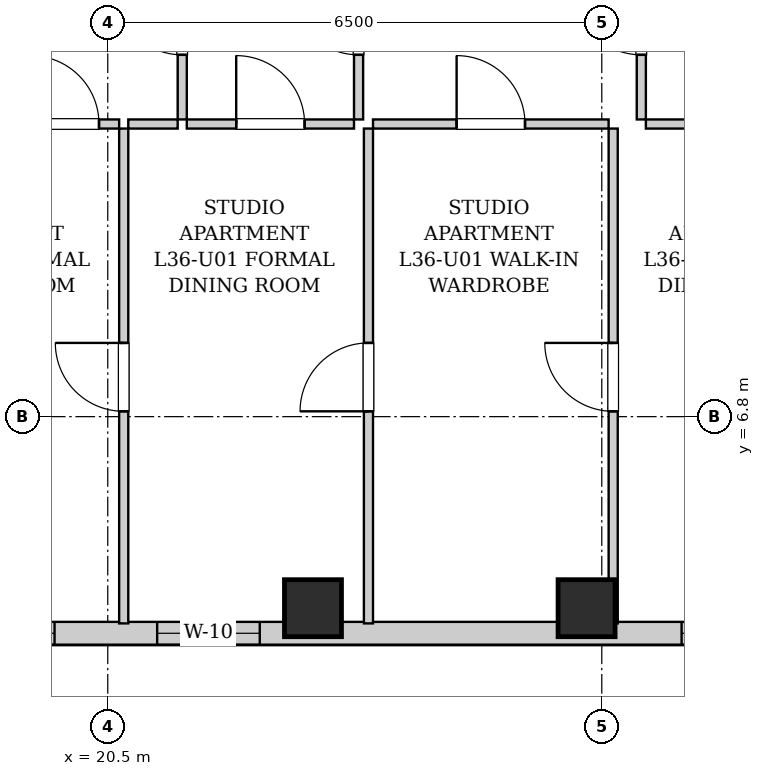
"""IFC4 building model, lengths in metres.
Left out: names, types, materials, properties, quantities, classifications, styles, units other than length and angle.
Written with IfcOpenShell. Run it as: python <this file> out.ifc"""

import sys

from ifc_helpers import new_model, si_unit, direction, frame, frame_2d, origin, origin_2d, place, context, subcontext, project, spatial, rectangle, extrude, element, fill, save


model = new_model("IFC4")
c1 = context("Model", 3, precision=1e-05, world=origin(), true_north=direction((0.0, 1.0)))
c2 = subcontext(c1, "Body", "Model", "MODEL_VIEW")
j1 = project(units=[si_unit("LENGTHUNIT", "METRE"), si_unit("PLANEANGLEUNIT", "RADIAN")], contexts=[c1])
p1 = place(None, origin())
s1 = spatial("IfcSite", under=j1, at=p1, CompositionType="ELEMENT")
p2 = place(p1, origin())
s2 = spatial("IfcBuilding", under=s1, at=p2, CompositionType="ELEMENT")
p3 = place(p2, frame((0.0, 0.0, 127.65)))
s3 = spatial("IfcBuildingStorey", under=s2, at=p3, CompositionType="ELEMENT", Elevation=127.65)
for number, where, z_axis, x_axis in (
    (1, (23.2, 4.28, 0.0), (0.0, 0.0, 1.0), (1.0, 0.0, 0.0)),
    (2, (26.8, 4.28, 0.0), (0.0, 0.0, 1.0), (1.0, 0.0, 0.0)),
):
    element("IfcColumn", number, at=place(p3, frame(where, z_axis=z_axis, x_axis=x_axis)), inside=s3, PredefinedType="COLUMN", context=c2, shape_type="SweptSolid", body=[
        extrude(rectangle(XDim=0.75, YDim=0.75, at=origin_2d()), origin(), (0.0, 0.0, 1.0), 3.25),
    ])
p4 = place(p3, frame((31.5, 3.95, 0.0), z_axis=(0.0, 0.0, 1.0), x_axis=(-1.0, 0.0, 0.0)))
e3 = element("IfcWall", 3, at=p4, inside=s3, PredefinedType="SOLIDWALL", context=c2, shape_type="SweptSolid", body=[
    extrude(rectangle(XDim=15.6, YDim=0.3, at=frame_2d((7.8, 0.0))), origin(), (0.0, 0.0, 1.0), 2.99),
])
p5 = place(p4, frame((14.275, 0.0, 0.55)))
e4 = element("IfcOpeningElement", 4, at=p5, cuts=e3, PredefinedType="OPENING", context=c2, shape_type="SweptSolid", body=[
    extrude(rectangle(XDim=0.85, YDim=1.2, at=frame_2d((0.425, 0.6))), frame((0.0, 0.16, 0.0), z_axis=(0.0, -1.0, 0.0), x_axis=(1.0, 0.0, 0.0)), (0.0, 0.0, 1.0), 0.32),
])
p6 = place(p4, frame((11.7, 0.0, 0.55)))
e5 = element("IfcOpeningElement", 5, at=p6, cuts=e3, PredefinedType="OPENING", context=c2, shape_type="SweptSolid", body=[
    extrude(rectangle(XDim=1.35, YDim=1.2, at=frame_2d((0.675, 0.6))), frame((0.0, 0.16, 0.0), z_axis=(0.0, -1.0, 0.0), x_axis=(1.0, 0.0, 0.0)), (0.0, 0.0, 1.0), 0.32),
])
p7 = place(p4, frame((9.0, 0.0, 0.55)))
e6 = element("IfcOpeningElement", 6, at=p7, cuts=e3, PredefinedType="OPENING", context=c2, shape_type="SweptSolid", body=[
    extrude(rectangle(XDim=1.35, YDim=1.2, at=frame_2d((0.675, 0.6))), frame((0.0, 0.16, 0.0), z_axis=(0.0, -1.0, 0.0), x_axis=(1.0, 0.0, 0.0)), (0.0, 0.0, 1.0), 0.32),
])
p8 = place(p4, frame((2.1, 0.0, 0.55)))
e7 = element("IfcOpeningElement", 7, at=p8, cuts=e3, PredefinedType="OPENING", context=c2, shape_type="SweptSolid", body=[
    extrude(rectangle(XDim=1.35, YDim=1.2, at=frame_2d((0.675, 0.6))), frame((0.0, 0.16, 0.0), z_axis=(0.0, -1.0, 0.0), x_axis=(1.0, 0.0, 0.0)), (0.0, 0.0, 1.0), 0.32),
])
p9 = place(p4, frame((0.23, 0.0, 0.55)))
e8 = element("IfcOpeningElement", 8, at=p9, cuts=e3, PredefinedType="OPENING", context=c2, shape_type="SweptSolid", body=[
    extrude(rectangle(XDim=0.68, YDim=1.2, at=frame_2d((0.34, 0.6))), frame((0.0, 0.16, 0.0), z_axis=(0.0, -1.0, 0.0), x_axis=(1.0, 0.0, 0.0)), (0.0, 0.0, 1.0), 0.32),
])
p10 = place(p3, frame((21.48, 10.71, 0.0), z_axis=(0.0, 0.0, 1.0), x_axis=(0.0, 1.0, 0.0)))
e9 = element("IfcWall", 9, at=p10, inside=s3, PredefinedType="PARTITIONING", context=c2, shape_type="SweptSolid", body=[
    extrude(rectangle(XDim=2.6, YDim=0.12, at=frame_2d((1.3, 0.0))), origin(), (0.0, 0.0, 1.0), 2.99),
])
p11 = place(p10, frame((0.85, 0.0, 0.0)))
e10 = element("IfcOpeningElement", 10, at=p11, cuts=e9, PredefinedType="OPENING", context=c2, shape_type="SweptSolid", body=[
    extrude(rectangle(XDim=0.9, YDim=2.05, at=frame_2d((0.45, 1.025))), frame((0.0, 0.07, 0.0), z_axis=(0.0, -1.0, 0.0), x_axis=(1.0, 0.0, 0.0)), (0.0, 0.0, 1.0), 0.14),
])
p12 = place(p3, frame((19.22, 10.65, 0.0), z_axis=(0.0, 0.0, 1.0), x_axis=(1.0, 0.0, 0.0)))
e11 = element("IfcWall", 11, at=p12, inside=s3, PredefinedType="PARTITIONING", context=c2, shape_type="SweptSolid", body=[
    extrude(rectangle(XDim=1.43, YDim=0.12, at=frame_2d((0.715, 0.0))), origin(), (0.0, 0.0, 1.0), 2.99),
])
p13 = place(p12, frame((0.265, 0.0, 0.0)))
e12 = element("IfcOpeningElement", 12, at=p13, cuts=e11, PredefinedType="OPENING", context=c2, shape_type="SweptSolid", body=[
    extrude(rectangle(XDim=0.9, YDim=2.05, at=frame_2d((0.45, 1.025))), frame((0.0, 0.07, 0.0), z_axis=(0.0, -1.0, 0.0), x_axis=(1.0, 0.0, 0.0)), (0.0, 0.0, 1.0), 0.14),
])
p14 = place(p3, frame((20.77, 10.65, 0.0), z_axis=(0.0, 0.0, 1.0), x_axis=(1.0, 0.0, 0.0)))
e13 = element("IfcWall", 13, at=p14, inside=s3, PredefinedType="PARTITIONING", context=c2, shape_type="SweptSolid", body=[
    extrude(rectangle(XDim=0.65, YDim=0.12, at=frame_2d((0.325, 0.0))), origin(), (0.0, 0.0, 1.0), 2.99),
])
p15 = place(p3, frame((23.8, 10.71, 0.0), z_axis=(0.0, 0.0, 1.0), x_axis=(0.0, 1.0, 0.0)))
e14 = element("IfcWall", 14, at=p15, inside=s3, PredefinedType="PARTITIONING", context=c2, shape_type="SweptSolid", body=[
    extrude(rectangle(XDim=2.6, YDim=0.12, at=frame_2d((1.3, 0.0))), origin(), (0.0, 0.0, 1.0), 2.99),
])
p16 = place(p15, frame((0.85, 0.0, 0.0)))
e15 = element("IfcOpeningElement", 15, at=p16, cuts=e14, PredefinedType="OPENING", context=c2, shape_type="SweptSolid", body=[
    extrude(rectangle(XDim=0.9, YDim=2.05, at=frame_2d((0.45, 1.025))), frame((0.0, 0.07, 0.0), z_axis=(0.0, -1.0, 0.0), x_axis=(1.0, 0.0, 0.0)), (0.0, 0.0, 1.0), 0.14),
])
p17 = place(p3, frame((21.54, 10.65, 0.0), z_axis=(0.0, 0.0, 1.0), x_axis=(1.0, 0.0, 0.0)))
e16 = element("IfcWall", 16, at=p17, inside=s3, PredefinedType="PARTITIONING", context=c2, shape_type="SweptSolid", body=[
    extrude(rectangle(XDim=2.2, YDim=0.12, at=frame_2d((1.1, 0.0))), origin(), (0.0, 0.0, 1.0), 2.99),
])
p18 = place(p17, frame((0.65, 0.0, 0.0)))
e17 = element("IfcOpeningElement", 17, at=p18, cuts=e16, PredefinedType="OPENING", context=c2, shape_type="SweptSolid", body=[
    extrude(rectangle(XDim=0.9, YDim=2.05, at=frame_2d((0.45, 1.025))), frame((0.0, 0.07, 0.0), z_axis=(0.0, -1.0, 0.0), x_axis=(1.0, 0.0, 0.0)), (0.0, 0.0, 1.0), 0.14),
])
p19 = place(p3, frame((27.52, 10.71, 0.0), z_axis=(0.0, 0.0, 1.0), x_axis=(0.0, 1.0, 0.0)))
e18 = element("IfcWall", 18, at=p19, inside=s3, PredefinedType="PARTITIONING", context=c2, shape_type="SweptSolid", body=[
    extrude(rectangle(XDim=2.6, YDim=0.12, at=frame_2d((1.3, 0.0))), origin(), (0.0, 0.0, 1.0), 2.99),
])
p20 = place(p19, frame((0.85, 0.0, 0.0)))
e19 = element("IfcOpeningElement", 19, at=p20, cuts=e18, PredefinedType="OPENING", context=c2, shape_type="SweptSolid", body=[
    extrude(rectangle(XDim=0.9, YDim=2.05, at=frame_2d((0.45, 1.025))), frame((0.0, 0.07, 0.0), z_axis=(0.0, -1.0, 0.0), x_axis=(1.0, 0.0, 0.0)), (0.0, 0.0, 1.0), 0.14),
])
p21 = place(p3, frame((23.99, 10.65, 0.0), z_axis=(0.0, 0.0, 1.0), x_axis=(1.0, 0.0, 0.0)))
e20 = element("IfcWall", 20, at=p21, inside=s3, PredefinedType="PARTITIONING", context=c2, shape_type="SweptSolid", body=[
    extrude(rectangle(XDim=3.1, YDim=0.12, at=frame_2d((1.55, 0.0))), origin(), (0.0, 0.0, 1.0), 2.99),
])
p22 = place(p21, frame((1.1, 0.0, 0.0)))
e21 = element("IfcOpeningElement", 21, at=p22, cuts=e20, PredefinedType="OPENING", context=c2, shape_type="SweptSolid", body=[
    extrude(rectangle(XDim=0.9, YDim=2.05, at=frame_2d((0.45, 1.025))), frame((0.0, 0.07, 0.0), z_axis=(0.0, -1.0, 0.0), x_axis=(1.0, 0.0, 0.0)), (0.0, 0.0, 1.0), 0.14),
])
p23 = place(p3, frame((27.58, 10.65, 0.0), z_axis=(0.0, 0.0, 1.0), x_axis=(1.0, 0.0, 0.0)))
e22 = element("IfcWall", 22, at=p23, inside=s3, PredefinedType="PARTITIONING", context=c2, shape_type="SweptSolid", body=[
    extrude(rectangle(XDim=2.73, YDim=0.12, at=frame_2d((1.365, 0.0))), origin(), (0.0, 0.0, 1.0), 2.99),
])
p24 = place(p23, frame((0.915, 0.0, 0.0)))
e23 = element("IfcOpeningElement", 23, at=p24, cuts=e22, PredefinedType="OPENING", context=c2, shape_type="SweptSolid", body=[
    extrude(rectangle(XDim=0.9, YDim=2.05, at=frame_2d((0.45, 1.025))), frame((0.0, 0.07, 0.0), z_axis=(0.0, -1.0, 0.0), x_axis=(1.0, 0.0, 0.0)), (0.0, 0.0, 1.0), 0.14),
])
p25 = place(p3, frame((20.71, 4.08, 0.0), z_axis=(0.0, 0.0, 1.0), x_axis=(0.0, 1.0, 0.0)))
e24 = element("IfcWall", 24, at=p25, inside=s3, PredefinedType="PARTITIONING", context=c2, shape_type="SweptSolid", body=[
    extrude(rectangle(XDim=6.51, YDim=0.12, at=frame_2d((3.255, 0.0))), origin(), (0.0, 0.0, 1.0), 2.99),
])
p26 = place(p25, frame((2.79, 0.0, 0.0)))
e25 = element("IfcOpeningElement", 25, at=p26, cuts=e24, PredefinedType="OPENING", context=c2, shape_type="SweptSolid", body=[
    extrude(rectangle(XDim=0.9, YDim=2.05, at=frame_2d((0.45, 1.025))), frame((0.0, 0.07, 0.0), z_axis=(0.0, -1.0, 0.0), x_axis=(1.0, 0.0, 0.0)), (0.0, 0.0, 1.0), 0.14),
])
p27 = place(p3, frame((23.93, 4.08, 0.0), z_axis=(0.0, 0.0, 1.0), x_axis=(0.0, 1.0, 0.0)))
e26 = element("IfcWall", 26, at=p27, inside=s3, PredefinedType="PARTITIONING", context=c2, shape_type="SweptSolid", body=[
    extrude(rectangle(XDim=6.51, YDim=0.12, at=frame_2d((3.255, 0.0))), origin(), (0.0, 0.0, 1.0), 2.99),
])
p28 = place(p27, frame((2.79, 0.0, 0.0)))
e27 = element("IfcOpeningElement", 27, at=p28, cuts=e26, PredefinedType="OPENING", context=c2, shape_type="SweptSolid", body=[
    extrude(rectangle(XDim=0.9, YDim=2.05, at=frame_2d((0.45, 1.025))), frame((0.0, 0.07, 0.0), z_axis=(0.0, -1.0, 0.0), x_axis=(1.0, 0.0, 0.0)), (0.0, 0.0, 1.0), 0.14),
])
p29 = place(p3, frame((27.15, 4.08, 0.0), z_axis=(0.0, 0.0, 1.0), x_axis=(0.0, 1.0, 0.0)))
e28 = element("IfcWall", 28, at=p29, inside=s3, PredefinedType="PARTITIONING", context=c2, shape_type="SweptSolid", body=[
    extrude(rectangle(XDim=6.51, YDim=0.12, at=frame_2d((3.255, 0.0))), origin(), (0.0, 0.0, 1.0), 2.99),
])
p30 = place(p29, frame((2.79, 0.0, 0.0)))
e29 = element("IfcOpeningElement", 29, at=p30, cuts=e28, PredefinedType="OPENING", context=c2, shape_type="SweptSolid", body=[
    extrude(rectangle(XDim=0.9, YDim=2.05, at=frame_2d((0.45, 1.025))), frame((0.0, 0.07, 0.0), z_axis=(0.0, -1.0, 0.0), x_axis=(1.0, 0.0, 0.0)), (0.0, 0.0, 1.0), 0.14),
])
p31 = place(p11, origin())
e30 = element("IfcDoor", 30, at=p31, inside=s3, OperationType="SINGLE_SWING_RIGHT", PredefinedType="DOOR", context=c2, shape_type="SweptSolid", body=[
    extrude(rectangle(XDim=0.9, YDim=2.05, at=frame_2d((0.45, 1.025))), frame((0.0, 0.025, 0.0), z_axis=(0.0, -1.0, 0.0), x_axis=(1.0, 0.0, 0.0)), (0.0, 0.0, 1.0), 0.05),
])
fill(e10, e30)
p32 = place(p13, origin())
e31 = element("IfcDoor", 31, at=p32, inside=s3, OperationType="SINGLE_SWING_LEFT", PredefinedType="DOOR", context=c2, shape_type="SweptSolid", body=[
    extrude(rectangle(XDim=0.9, YDim=2.05, at=frame_2d((0.45, 1.025))), frame((0.0, 0.025, 0.0), z_axis=(0.0, -1.0, 0.0), x_axis=(1.0, 0.0, 0.0)), (0.0, 0.0, 1.0), 0.05),
])
fill(e12, e31)
p33 = place(p16, origin())
e32 = element("IfcDoor", 32, at=p33, inside=s3, OperationType="SINGLE_SWING_RIGHT", PredefinedType="DOOR", context=c2, shape_type="SweptSolid", body=[
    extrude(rectangle(XDim=0.9, YDim=2.05, at=frame_2d((0.45, 1.025))), frame((0.0, 0.025, 0.0), z_axis=(0.0, -1.0, 0.0), x_axis=(1.0, 0.0, 0.0)), (0.0, 0.0, 1.0), 0.05),
])
fill(e15, e32)
p34 = place(p18, origin())
e33 = element("IfcDoor", 33, at=p34, inside=s3, OperationType="SINGLE_SWING_LEFT", PredefinedType="DOOR", context=c2, shape_type="SweptSolid", body=[
    extrude(rectangle(XDim=0.9, YDim=2.05, at=frame_2d((0.45, 1.025))), frame((0.0, 0.025, 0.0), z_axis=(0.0, -1.0, 0.0), x_axis=(1.0, 0.0, 0.0)), (0.0, 0.0, 1.0), 0.05),
])
fill(e17, e33)
p35 = place(p20, origin())
e34 = element("IfcDoor", 34, at=p35, inside=s3, OperationType="SINGLE_SWING_RIGHT", PredefinedType="DOOR", context=c2, shape_type="SweptSolid", body=[
    extrude(rectangle(XDim=0.9, YDim=2.05, at=frame_2d((0.45, 1.025))), frame((0.0, 0.025, 0.0), z_axis=(0.0, -1.0, 0.0), x_axis=(1.0, 0.0, 0.0)), (0.0, 0.0, 1.0), 0.05),
])
fill(e19, e34)
p36 = place(p22, origin())
e35 = element("IfcDoor", 35, at=p36, inside=s3, OperationType="SINGLE_SWING_LEFT", PredefinedType="DOOR", context=c2, shape_type="SweptSolid", body=[
    extrude(rectangle(XDim=0.9, YDim=2.05, at=frame_2d((0.45, 1.025))), frame((0.0, 0.025, 0.0), z_axis=(0.0, -1.0, 0.0), x_axis=(1.0, 0.0, 0.0)), (0.0, 0.0, 1.0), 0.05),
])
fill(e21, e35)
p37 = place(p26, origin())
e36 = element("IfcDoor", 36, at=p37, inside=s3, OperationType="SINGLE_SWING_RIGHT", PredefinedType="DOOR", context=c2, shape_type="SweptSolid", body=[
    extrude(rectangle(XDim=0.9, YDim=2.05, at=frame_2d((0.45, 1.025))), frame((0.0, 0.025, 0.0), z_axis=(0.0, -1.0, 0.0), x_axis=(1.0, 0.0, 0.0)), (0.0, 0.0, 1.0), 0.05),
])
fill(e25, e36)
p38 = place(p28, origin())
e37 = element("IfcDoor", 37, at=p38, inside=s3, OperationType="SINGLE_SWING_LEFT", PredefinedType="DOOR", context=c2, shape_type="SweptSolid", body=[
    extrude(rectangle(XDim=0.9, YDim=2.05, at=frame_2d((0.45, 1.025))), frame((0.0, 0.025, 0.0), z_axis=(0.0, -1.0, 0.0), x_axis=(1.0, 0.0, 0.0)), (0.0, 0.0, 1.0), 0.05),
])
fill(e27, e37)
p39 = place(p30, origin())
e38 = element("IfcDoor", 38, at=p39, inside=s3, OperationType="SINGLE_SWING_RIGHT", PredefinedType="DOOR", context=c2, shape_type="SweptSolid", body=[
    extrude(rectangle(XDim=0.9, YDim=2.05, at=frame_2d((0.45, 1.025))), frame((0.0, 0.025, 0.0), z_axis=(0.0, -1.0, 0.0), x_axis=(1.0, 0.0, 0.0)), (0.0, 0.0, 1.0), 0.05),
])
fill(e29, e38)
p40 = place(p6, origin())
e39 = element("IfcWindow", 39, at=p40, inside=s3, PartitioningType="SINGLE_PANEL", PredefinedType="WINDOW", context=c2, shape_type="SweptSolid", body=[
    extrude(rectangle(XDim=1.35, YDim=1.2, at=frame_2d((0.675, 0.6))), frame((0.0, 0.03, 0.0), z_axis=(0.0, -1.0, 0.0), x_axis=(1.0, 0.0, 0.0)), (0.0, 0.0, 1.0), 0.06),
])
fill(e5, e39)
p41 = place(p7, origin())
e40 = element("IfcWindow", 40, at=p41, inside=s3, PartitioningType="SINGLE_PANEL", PredefinedType="WINDOW", context=c2, shape_type="SweptSolid", body=[
    extrude(rectangle(XDim=1.35, YDim=1.2, at=frame_2d((0.675, 0.6))), frame((0.0, 0.03, 0.0), z_axis=(0.0, -1.0, 0.0), x_axis=(1.0, 0.0, 0.0)), (0.0, 0.0, 1.0), 0.06),
])
fill(e6, e40)
p42 = place(p8, origin())
e41 = element("IfcWindow", 41, at=p42, inside=s3, PartitioningType="SINGLE_PANEL", PredefinedType="WINDOW", context=c2, shape_type="SweptSolid", body=[
    extrude(rectangle(XDim=1.35, YDim=1.2, at=frame_2d((0.675, 0.6))), frame((0.0, 0.03, 0.0), z_axis=(0.0, -1.0, 0.0), x_axis=(1.0, 0.0, 0.0)), (0.0, 0.0, 1.0), 0.06),
])
fill(e7, e41)
save(model, sys.argv[1])
